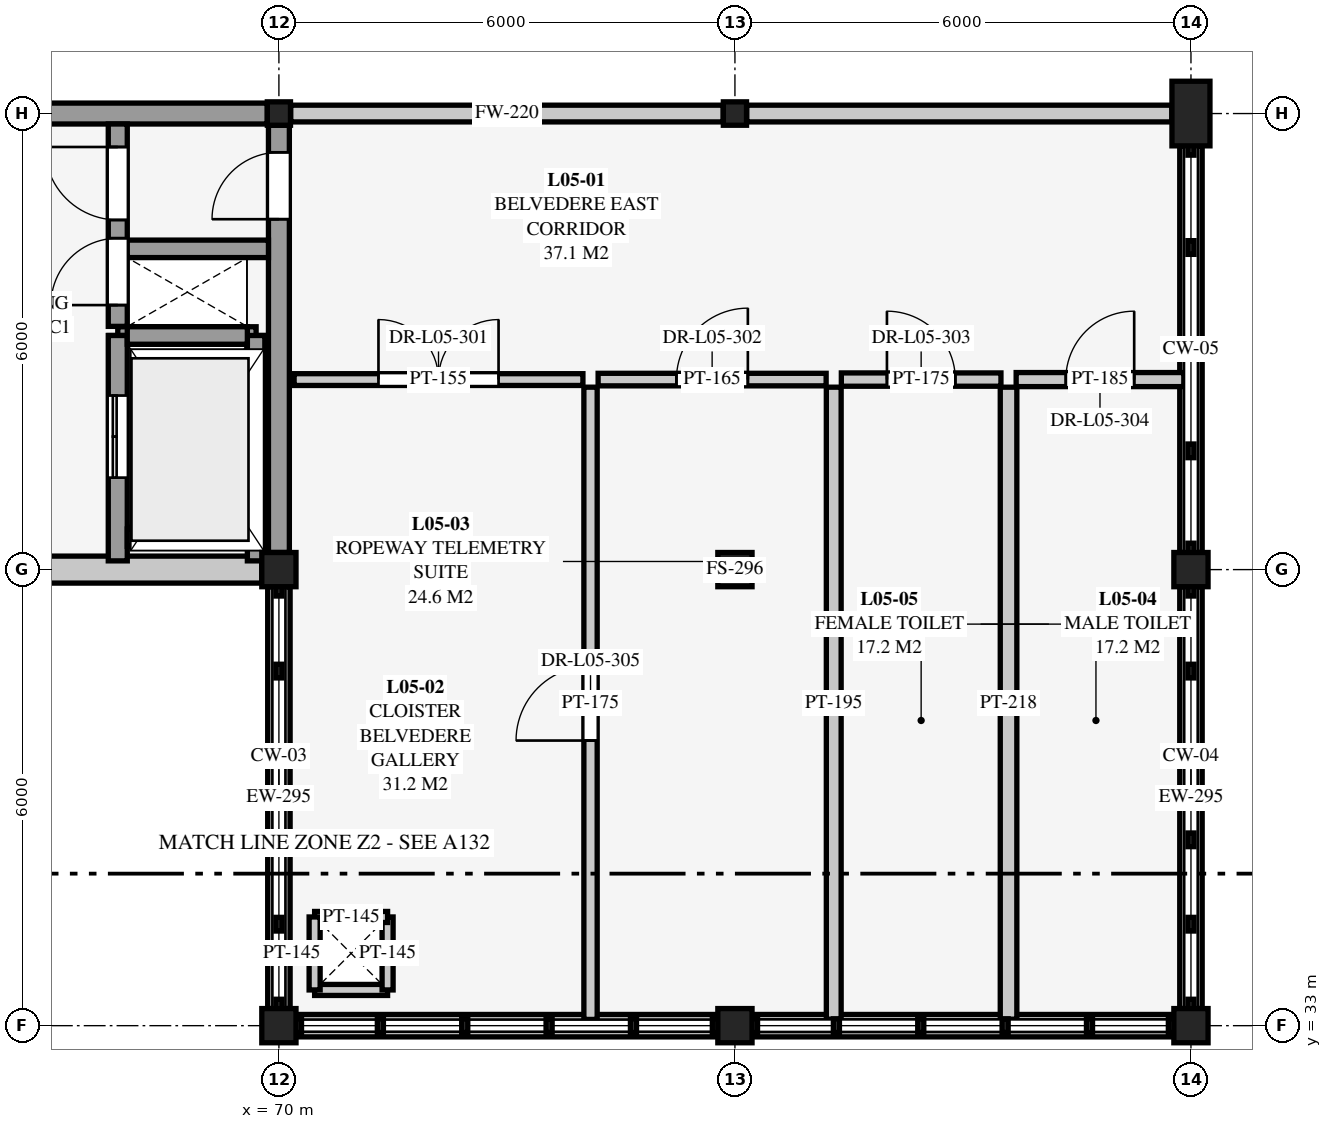
"""IFC4 building model, lengths in metres.
Left out: names, types, materials, properties, quantities, classifications, styles, units other than length and angle.
Written with IfcOpenShell. Run it as: python <this file> out.ifc"""

import sys

from ifc_helpers import new_model, si_unit, direction, frame, frame_2d, origin, origin_2d, place, context, subcontext, project, spatial, rectangle, i_section, extrude, element, fill, save


model = new_model("IFC4")
c1 = context("Model", 3, precision=1e-05, world=origin(), true_north=direction((0.0, 1.0)))
c2 = subcontext(c1, "Body", "Model", "MODEL_VIEW")
j1 = project(units=[si_unit("LENGTHUNIT", "METRE"), si_unit("PLANEANGLEUNIT", "RADIAN")], contexts=[c1])
p1 = place(None, origin())
s1 = spatial("IfcSite", under=j1, at=p1, CompositionType="ELEMENT")
p2 = place(p1, origin())
s2 = spatial("IfcBuilding", under=s1, at=p2, CompositionType="ELEMENT")
p3 = place(p2, frame((0.0, 0.0, 18.0)))
s3 = spatial("IfcBuildingStorey", under=s2, at=p3, CompositionType="ELEMENT", Elevation=18.0)
for number, where, z_axis, x_axis in (
    (1, (70.0, 33.0, 0.0), (0.0, 0.0, 1.0), (1.0, 0.0, 0.0)),
    (2, (70.0, 39.0, 0.0), (0.0, 0.0, 1.0), (1.0, 0.0, 0.0)),
):
    element("IfcColumn", number, at=place(p3, frame(where, z_axis=z_axis, x_axis=x_axis)), inside=s3, PredefinedType="COLUMN", context=c2, shape_type="SweptSolid", body=[
        extrude(rectangle(XDim=0.45, YDim=0.45, at=origin_2d()), origin(), (0.0, 0.0, 1.0), 4.5),
    ])
p4 = place(p3, frame((70.0, 45.0, 0.0), z_axis=(0.0, 0.0, 1.0), x_axis=(1.0, 0.0, 0.0)))
e3 = element("IfcColumn", 3, at=p4, inside=s3, PredefinedType="COLUMN", context=c2, shape_type="SweptSolid", body=[
    extrude(i_section(OverallWidth=0.305, OverallDepth=0.308, WebThickness=0.01, FlangeThickness=0.015, at=origin_2d()), origin(), (0.0, 0.0, 1.0), 4.5),
])
for number, where, z_axis, x_axis in (
    (4, (76.0, 33.0, 0.0), (0.0, 0.0, 1.0), (1.0, 0.0, 0.0)),
    (5, (76.0, 39.0, 0.0), (0.0, 0.0, 1.0), (1.0, 0.0, 0.0)),
):
    element("IfcColumn", number, at=place(p3, frame(where, z_axis=z_axis, x_axis=x_axis)), inside=s3, PredefinedType="COLUMN", context=c2, shape_type="SweptSolid", body=[
        extrude(rectangle(XDim=0.45, YDim=0.45, at=origin_2d()), origin(), (0.0, 0.0, 1.0), 4.5),
    ])
p5 = place(p3, frame((76.0, 45.0, 0.0), z_axis=(0.0, 0.0, 1.0), x_axis=(1.0, 0.0, 0.0)))
e6 = element("IfcColumn", 6, at=p5, inside=s3, PredefinedType="COLUMN", context=c2, shape_type="SweptSolid", body=[
    extrude(i_section(OverallWidth=0.305, OverallDepth=0.308, WebThickness=0.01, FlangeThickness=0.015, at=origin_2d()), origin(), (0.0, 0.0, 1.0), 4.5),
])
for number, where, z_axis, x_axis in (
    (7, (82.0, 33.0, 0.0), (0.0, 0.0, 1.0), (1.0, 0.0, 0.0)),
    (8, (82.0, 39.0, 0.0), (0.0, 0.0, 1.0), (1.0, 0.0, 0.0)),
):
    element("IfcColumn", number, at=place(p3, frame(where, z_axis=z_axis, x_axis=x_axis)), inside=s3, PredefinedType="COLUMN", context=c2, shape_type="SweptSolid", body=[
        extrude(rectangle(XDim=0.45, YDim=0.45, at=origin_2d()), origin(), (0.0, 0.0, 1.0), 4.5),
    ])
p6 = place(p3, frame((82.0, 45.0, 0.0), z_axis=(0.0, 0.0, 1.0), x_axis=(1.0, 0.0, 0.0)))
e9 = element("IfcColumn", 9, at=p6, inside=s3, PredefinedType="PILASTER", context=c2, shape_type="SweptSolid", body=[
    extrude(rectangle(XDim=0.5, YDim=0.85, at=origin_2d()), origin(), (0.0, 0.0, 1.0), 4.5),
])
p7 = place(p2, frame((0.0, 0.0, 13.5)))
s4 = spatial("IfcBuildingStorey", under=s2, at=p7, CompositionType="ELEMENT", Elevation=13.5)
p8 = place(p7, frame((87.75, 45.0, 0.0), z_axis=(0.0, 0.0, 1.0), x_axis=(-1.0, 0.0, 0.0)))
e10 = element("IfcWall", 10, at=p8, inside=s4, PredefinedType="SOLIDWALL", context=c2, shape_type="SweptSolid", body=[
    extrude(rectangle(XDim=5.5, YDim=0.4, at=frame_2d((2.75, 0.0))), origin(), (0.0, 0.0, 1.0), 8.593),
])
p9 = place(p8, frame((2.1, 0.0, 1.3)))
e11 = element("IfcOpeningElement", 11, at=p9, cuts=e10, PredefinedType="OPENING", context=c2, shape_type="SweptSolid", body=[
    extrude(rectangle(XDim=1.3, YDim=1.45, at=frame_2d((0.65, 0.725))), frame((0.0, 0.21, 0.0), z_axis=(0.0, -1.0, 0.0), x_axis=(1.0, 0.0, 0.0)), (0.0, 0.0, 1.0), 0.42),
])
p10 = place(p3, frame((69.775, 39.0, 0.0), z_axis=(0.0, 0.0, 1.0), x_axis=(-1.0, 0.0, 0.0)))
e12 = element("IfcWall", 12, at=p10, inside=s3, PredefinedType="SOLIDWALL", context=c2, shape_type="SweptSolid", body=[
    extrude(rectangle(XDim=5.55, YDim=0.355, at=frame_2d((2.775, 0.0))), origin(), (0.0, 0.0, 1.0), 4.234),
])
p11 = place(p3, frame((75.775, 33.0, 0.0), z_axis=(0.0, 0.0, 1.0), x_axis=(-1.0, 0.0, 0.0)))
e13 = element("IfcWall", 13, at=p11, inside=s3, PredefinedType="SOLIDWALL", context=c2, shape_type="SweptSolid", body=[
    extrude(rectangle(XDim=5.55, YDim=0.295, at=frame_2d((2.775, 0.0))), origin(), (0.0, 0.0, 1.0), 0.16),
])
p12 = place(p3, frame((81.775, 33.0, 0.0), z_axis=(0.0, 0.0, 1.0), x_axis=(-1.0, 0.0, 0.0)))
e14 = element("IfcWall", 14, at=p12, inside=s3, PredefinedType="SOLIDWALL", context=c2, shape_type="SweptSolid", body=[
    extrude(rectangle(XDim=5.55, YDim=0.295, at=frame_2d((2.775, 0.0))), origin(), (0.0, 0.0, 1.0), 0.21),
])
p13 = place(p3, frame((70.0, 33.225, 0.0), z_axis=(0.0, 0.0, 1.0), x_axis=(0.0, 1.0, 0.0)))
e15 = element("IfcWall", 15, at=p13, inside=s3, PredefinedType="SOLIDWALL", context=c2, shape_type="SweptSolid", body=[
    extrude(rectangle(XDim=5.55, YDim=0.295, at=frame_2d((2.775, 0.0))), origin(), (0.0, 0.0, 1.0), 0.26),
])
p14 = place(p3, frame((82.0, 38.775, 0.0), z_axis=(0.0, 0.0, 1.0), x_axis=(0.0, -1.0, 0.0)))
e16 = element("IfcWall", 16, at=p14, inside=s3, PredefinedType="SOLIDWALL", context=c2, shape_type="SweptSolid", body=[
    extrude(rectangle(XDim=5.55, YDim=0.295, at=frame_2d((2.775, 0.0))), origin(), (0.0, 0.0, 1.0), 0.31),
])
p15 = place(p3, frame((82.0, 44.575, 0.0), z_axis=(0.0, 0.0, 1.0), x_axis=(0.0, -1.0, 0.0)))
e17 = element("IfcWall", 17, at=p15, inside=s3, PredefinedType="SOLIDWALL", context=c2, shape_type="SweptSolid", body=[
    extrude(rectangle(XDim=5.35, YDim=0.295, at=frame_2d((2.675, 0.0))), origin(), (0.0, 0.0, 1.0), 0.36),
])
for number, where, z_axis, x_axis in (
    (18, (70.47, 33.47, 0.0), (0.0, 0.0, 1.0), (1.0, 0.0, 0.0)),
    (19, (71.43, 33.47, 0.0), (0.0, 0.0, 1.0), (0.0, 1.0, 0.0)),
    (20, (71.43, 34.43, 0.0), (0.0, 0.0, 1.0), (-1.0, 0.0, 0.0)),
    (21, (70.47, 34.43, 0.0), (0.0, 0.0, 1.0), (0.0, -1.0, 0.0)),
):
    element("IfcWall", number, at=place(p3, frame(where, z_axis=z_axis, x_axis=x_axis)), inside=s3, PredefinedType="PARTITIONING", context=c2, shape_type="SweptSolid", body=[
        extrude(rectangle(XDim=0.96, YDim=0.145, at=frame_2d((0.48, 0.0))), origin(), (0.0, 0.0, 1.0), 4.24),
    ])
p16 = place(p3, frame((67.88, 39.42, 4.5), z_axis=(0.0, 0.0, 1.0), x_axis=(1.0, 0.0, 0.0)))
e22 = element("IfcWall", 22, at=p16, inside=s3, PredefinedType="SHEAR", context=c2, shape_type="SweptSolid", body=[
    extrude(rectangle(XDim=1.82, YDim=0.23, at=frame_2d((0.91, 0.0))), origin(), (0.0, 0.0, 1.0), 1.25),
])
p17 = place(p3, frame((69.7, 39.42, 4.5), z_axis=(0.0, 0.0, 1.0), x_axis=(0.0, 1.0, 0.0)))
e23 = element("IfcWall", 23, at=p17, inside=s3, PredefinedType="SHEAR", context=c2, shape_type="SweptSolid", body=[
    extrude(rectangle(XDim=2.66, YDim=0.23, at=frame_2d((1.33, 0.0))), origin(), (0.0, 0.0, 1.0), 1.25),
])
p18 = place(p3, frame((69.7, 42.08, 4.5), z_axis=(0.0, 0.0, 1.0), x_axis=(-1.0, 0.0, 0.0)))
e24 = element("IfcWall", 24, at=p18, inside=s3, PredefinedType="SHEAR", context=c2, shape_type="SweptSolid", body=[
    extrude(rectangle(XDim=1.82, YDim=0.23, at=frame_2d((0.91, 0.0))), origin(), (0.0, 0.0, 1.0), 1.25),
])
p19 = place(p3, frame((67.88, 42.08, 4.5), z_axis=(0.0, 0.0, 1.0), x_axis=(0.0, -1.0, 0.0)))
e25 = element("IfcWall", 25, at=p19, inside=s3, PredefinedType="SHEAR", context=c2, shape_type="SweptSolid", body=[
    extrude(rectangle(XDim=2.66, YDim=0.23, at=frame_2d((1.33, 0.0))), origin(), (0.0, 0.0, 1.0), 1.25),
])
p20 = place(p3, frame((64.153, 45.0, 0.0), z_axis=(0.0, 0.0, 1.0), x_axis=(1.0, 0.0, 0.0)))
e26 = element("IfcWall", 26, at=p20, inside=s3, PredefinedType="SHEAR", context=c2, shape_type="SweptSolid", body=[
    extrude(rectangle(XDim=5.695, YDim=0.275, at=frame_2d((2.847, 0.0))), origin(), (0.0, 0.0, 1.0), 4.24),
])
p21 = place(p3, frame((70.0, 39.225, 0.0), z_axis=(0.0, 0.0, 1.0), x_axis=(0.0, 1.0, 0.0)))
e27 = element("IfcWall", 27, at=p21, inside=s3, PredefinedType="SHEAR", context=c2, shape_type="SweptSolid", body=[
    extrude(rectangle(XDim=5.621, YDim=0.275, at=frame_2d((2.811, 0.0))), origin(), (0.0, 0.0, 1.0), 4.24),
])
p22 = place(p21, frame((4.385, 0.0, 0.0)))
e28 = element("IfcOpeningElement", 28, at=p22, cuts=e27, PredefinedType="OPENING", context=c2, shape_type="SweptSolid", body=[
    extrude(rectangle(XDim=0.88, YDim=2.08, at=frame_2d((0.44, 1.04))), frame((0.0, 0.147, 0.0), z_axis=(0.0, -1.0, 0.0), x_axis=(1.0, 0.0, 0.0)), (0.0, 0.0, 1.0), 0.295),
])
p23 = place(p3, frame((67.88, 39.115, 0.0), z_axis=(0.0, 0.0, 1.0), x_axis=(0.0, 1.0, 0.0)))
e29 = element("IfcWall", 29, at=p23, inside=s3, PredefinedType="SHEAR", context=c2, shape_type="SweptSolid", body=[
    extrude(rectangle(XDim=2.965, YDim=0.25, at=frame_2d((1.482, 0.0))), origin(), (0.0, 0.0, 1.0), 4.5),
])
p24 = place(p23, frame((1.095, 0.0, 0.0)))
e30 = element("IfcOpeningElement", 30, at=p24, cuts=e29, PredefinedType="OPENING", context=c2, shape_type="SweptSolid", body=[
    extrude(rectangle(XDim=1.08, YDim=2.15, at=frame_2d((0.54, 1.075))), frame((0.0, 0.135, 0.0), z_axis=(0.0, -1.0, 0.0), x_axis=(1.0, 0.0, 0.0)), (0.0, 0.0, 1.0), 0.27),
])
p25 = place(p3, frame((68.005, 39.42, 0.0), z_axis=(0.0, 0.0, 1.0), x_axis=(1.0, 0.0, 0.0)))
e31 = element("IfcWall", 31, at=p25, inside=s3, PredefinedType="SHEAR", context=c2, shape_type="SweptSolid", body=[
    extrude(rectangle(XDim=1.58, YDim=0.23, at=frame_2d((0.79, 0.0))), origin(), (0.0, 0.0, 1.0), 4.5),
])
p26 = place(p3, frame((69.7, 39.115, 0.0), z_axis=(0.0, 0.0, 1.0), x_axis=(0.0, 1.0, 0.0)))
e32 = element("IfcWall", 32, at=p26, inside=s3, PredefinedType="SHEAR", context=c2, shape_type="SweptSolid", body=[
    extrude(rectangle(XDim=2.965, YDim=0.23, at=frame_2d((1.482, 0.0))), origin(), (0.0, 0.0, 1.0), 4.5),
])
p27 = place(p3, frame((68.005, 42.08, 0.0), z_axis=(0.0, 0.0, 1.0), x_axis=(1.0, 0.0, 0.0)))
e33 = element("IfcWall", 33, at=p27, inside=s3, PredefinedType="SHEAR", context=c2, shape_type="SweptSolid", body=[
    extrude(rectangle(XDim=1.58, YDim=0.23, at=frame_2d((0.79, 0.0))), origin(), (0.0, 0.0, 1.0), 4.5),
])
p28 = place(p3, frame((67.88, 42.2, 0.0), z_axis=(0.0, 0.0, 1.0), x_axis=(0.0, 1.0, 0.0)))
e34 = element("IfcWall", 34, at=p28, inside=s3, PredefinedType="SHEAR", context=c2, shape_type="SweptSolid", body=[
    extrude(rectangle(XDim=2.663, YDim=0.25, at=frame_2d((1.331, 0.0))), origin(), (0.0, 0.0, 1.0), 4.24),
])
p29 = place(p28, frame((0.28, 0.0, 0.0)))
e35 = element("IfcOpeningElement", 35, at=p29, cuts=e34, PredefinedType="OPENING", context=c2, shape_type="SweptSolid", body=[
    extrude(rectangle(XDim=0.88, YDim=2.08, at=frame_2d((0.44, 1.04))), frame((0.0, 0.135, 0.0), z_axis=(0.0, -1.0, 0.0), x_axis=(1.0, 0.0, 0.0)), (0.0, 0.0, 1.0), 0.27),
])
p30 = place(p28, frame((1.4, 0.0, 0.0)))
e36 = element("IfcOpeningElement", 36, at=p30, cuts=e34, PredefinedType="OPENING", context=c2, shape_type="SweptSolid", body=[
    extrude(rectangle(XDim=0.96, YDim=2.12, at=frame_2d((0.48, 1.06))), frame((0.0, 0.135, 0.0), z_axis=(0.0, -1.0, 0.0), x_axis=(1.0, 0.0, 0.0)), (0.0, 0.0, 1.0), 0.27),
])
p31 = place(p3, frame((68.005, 43.22, 0.0), z_axis=(0.0, 0.0, 1.0), x_axis=(1.0, 0.0, 0.0)))
e37 = element("IfcWall", 37, at=p31, inside=s3, PredefinedType="SHEAR", context=c2, shape_type="SweptSolid", body=[
    extrude(rectangle(XDim=1.858, YDim=0.23, at=frame_2d((0.929, 0.0))), origin(), (0.0, 0.0, 1.0), 4.24),
])
p32 = place(p3, frame((70.155, 45.0, 0.0), z_axis=(0.0, 0.0, 1.0), x_axis=(1.0, 0.0, 0.0)))
e38 = element("IfcWall", 38, at=p32, inside=s3, PredefinedType="SOLIDWALL", context=c2, shape_type="SweptSolid", body=[
    extrude(rectangle(XDim=5.691, YDim=0.22, at=frame_2d((2.845, 0.0))), origin(), (0.0, 0.0, 1.0), 4.087),
])
p33 = place(p3, frame((76.155, 45.0, 0.0), z_axis=(0.0, 0.0, 1.0), x_axis=(1.0, 0.0, 0.0)))
e39 = element("IfcWall", 39, at=p33, inside=s3, PredefinedType="SOLIDWALL", context=c2, shape_type="SweptSolid", body=[
    extrude(rectangle(XDim=5.594, YDim=0.22, at=frame_2d((2.797, 0.0))), origin(), (0.0, 0.0, 1.0), 4.037),
])
p34 = place(p3, frame((70.2, 41.5, 0.0), z_axis=(0.0, 0.0, 1.0), x_axis=(1.0, 0.0, 0.0)))
e40 = element("IfcWall", 40, at=p34, inside=s3, PredefinedType="PARTITIONING", context=c2, shape_type="SweptSolid", body=[
    extrude(rectangle(XDim=3.8, YDim=0.155, at=frame_2d((1.9, 0.0))), origin(), (0.0, 0.0, 1.0), 4.24),
])
p35 = place(p34, frame((1.11, 0.0, 0.0)))
e41 = element("IfcOpeningElement", 41, at=p35, cuts=e40, PredefinedType="OPENING", context=c2, shape_type="SweptSolid", body=[
    extrude(rectangle(XDim=1.58, YDim=2.2, at=frame_2d((0.79, 1.1))), frame((0.0, 0.088, 0.0), z_axis=(0.0, -1.0, 0.0), x_axis=(1.0, 0.0, 0.0)), (0.0, 0.0, 1.0), 0.175),
])
p36 = place(p3, frame((74.2, 41.5, 0.0), z_axis=(0.0, 0.0, 1.0), x_axis=(1.0, 0.0, 0.0)))
e42 = element("IfcWall", 42, at=p36, inside=s3, PredefinedType="PARTITIONING", context=c2, shape_type="SweptSolid", body=[
    extrude(rectangle(XDim=3.0, YDim=0.165, at=frame_2d((1.5, 0.0))), origin(), (0.0, 0.0, 1.0), 4.24),
])
p37 = place(p36, frame((1.03, 0.0, 0.0)))
e43 = element("IfcOpeningElement", 43, at=p37, cuts=e42, PredefinedType="OPENING", context=c2, shape_type="SweptSolid", body=[
    extrude(rectangle(XDim=0.94, YDim=2.1, at=frame_2d((0.47, 1.05))), frame((0.0, 0.093, 0.0), z_axis=(0.0, -1.0, 0.0), x_axis=(1.0, 0.0, 0.0)), (0.0, 0.0, 1.0), 0.185),
])
p38 = place(p3, frame((77.4, 41.5, 0.0), z_axis=(0.0, 0.0, 1.0), x_axis=(1.0, 0.0, 0.0)))
e44 = element("IfcWall", 44, at=p38, inside=s3, PredefinedType="PARTITIONING", context=c2, shape_type="SweptSolid", body=[
    extrude(rectangle(XDim=2.1, YDim=0.175, at=frame_2d((1.05, 0.0))), origin(), (0.0, 0.0, 1.0), 4.24),
])
p39 = place(p38, frame((0.6, 0.0, 0.0)))
e45 = element("IfcOpeningElement", 45, at=p39, cuts=e44, PredefinedType="OPENING", context=c2, shape_type="SweptSolid", body=[
    extrude(rectangle(XDim=0.9, YDim=2.1, at=frame_2d((0.45, 1.05))), frame((0.0, 0.097, 0.0), z_axis=(0.0, -1.0, 0.0), x_axis=(1.0, 0.0, 0.0)), (0.0, 0.0, 1.0), 0.195),
])
p40 = place(p3, frame((79.7, 41.5, 0.0), z_axis=(0.0, 0.0, 1.0), x_axis=(1.0, 0.0, 0.0)))
e46 = element("IfcWall", 46, at=p40, inside=s3, PredefinedType="PARTITIONING", context=c2, shape_type="SweptSolid", body=[
    extrude(rectangle(XDim=2.206, YDim=0.185, at=frame_2d((1.103, 0.0))), origin(), (0.0, 0.0, 1.0), 4.24),
])
p41 = place(p40, frame((0.653, 0.0, 0.0)))
e47 = element("IfcOpeningElement", 47, at=p41, cuts=e46, PredefinedType="OPENING", context=c2, shape_type="SweptSolid", body=[
    extrude(rectangle(XDim=0.9, YDim=2.1, at=frame_2d((0.45, 1.05))), frame((0.0, 0.103, 0.0), z_axis=(0.0, -1.0, 0.0), x_axis=(1.0, 0.0, 0.0)), (0.0, 0.0, 1.0), 0.205),
])
p42 = place(p3, frame((74.1, 33.082, 0.0), z_axis=(0.0, 0.0, 1.0), x_axis=(0.0, 1.0, 0.0)))
e48 = element("IfcWall", 48, at=p42, inside=s3, PredefinedType="PARTITIONING", context=c2, shape_type="SweptSolid", body=[
    extrude(rectangle(XDim=8.318, YDim=0.175, at=frame_2d((4.159, 0.0))), origin(), (0.0, 0.0, 1.0), 4.24),
])
p43 = place(p42, frame((3.669, 0.0, 0.0)))
e49 = element("IfcOpeningElement", 49, at=p43, cuts=e48, PredefinedType="OPENING", context=c2, shape_type="SweptSolid", body=[
    extrude(rectangle(XDim=0.98, YDim=2.14, at=frame_2d((0.49, 1.07))), frame((0.0, 0.097, 0.0), z_axis=(0.0, -1.0, 0.0), x_axis=(1.0, 0.0, 0.0)), (0.0, 0.0, 1.0), 0.195),
])
p44 = place(p3, frame((77.3, 33.085, 0.0), z_axis=(0.0, 0.0, 1.0), x_axis=(0.0, 1.0, 0.0)))
e50 = element("IfcWall", 50, at=p44, inside=s3, PredefinedType="PARTITIONING", context=c2, shape_type="SweptSolid", body=[
    extrude(rectangle(XDim=8.315, YDim=0.195, at=frame_2d((4.157, 0.0))), origin(), (0.0, 0.0, 1.0), 4.24),
])
p45 = place(p3, frame((79.6, 33.085, 0.0), z_axis=(0.0, 0.0, 1.0), x_axis=(0.0, 1.0, 0.0)))
e51 = element("IfcWall", 51, at=p45, inside=s3, PredefinedType="PARTITIONING", context=c2, shape_type="SweptSolid", body=[
    extrude(rectangle(XDim=8.315, YDim=0.218, at=frame_2d((4.157, 0.0))), origin(), (0.0, 0.0, 1.0), 4.24),
])
p46 = place(p22, origin())
e52 = element("IfcDoor", 52, at=p46, inside=s3, OperationType="SINGLE_SWING_LEFT", PredefinedType="DOOR", context=c2, shape_type="SweptSolid", body=[
    extrude(rectangle(XDim=0.88, YDim=2.08, at=frame_2d((0.44, 1.04))), frame((0.0, 0.025, 0.0), z_axis=(0.0, -1.0, 0.0), x_axis=(1.0, 0.0, 0.0)), (0.0, 0.0, 1.0), 0.05),
])
fill(e28, e52)
p47 = place(p24, origin())
e53 = element("IfcDoor", 53, at=p47, inside=s3, OperationType="DOUBLE_DOOR_SLIDING", PredefinedType="DOOR", context=c2, shape_type="SweptSolid", body=[
    extrude(rectangle(XDim=1.08, YDim=2.15, at=frame_2d((0.54, 1.075))), frame((0.0, 0.025, 0.0), z_axis=(0.0, -1.0, 0.0), x_axis=(1.0, 0.0, 0.0)), (0.0, 0.0, 1.0), 0.05),
])
fill(e30, e53)
p48 = place(p29, origin())
e54 = element("IfcDoor", 54, at=p48, inside=s3, OperationType="SINGLE_SWING_LEFT", PredefinedType="DOOR", context=c2, shape_type="SweptSolid", body=[
    extrude(rectangle(XDim=0.88, YDim=2.08, at=frame_2d((0.44, 1.04))), frame((0.0, 0.025, 0.0), z_axis=(0.0, -1.0, 0.0), x_axis=(1.0, 0.0, 0.0)), (0.0, 0.0, 1.0), 0.05),
])
fill(e35, e54)
p49 = place(p30, origin())
e55 = element("IfcDoor", 55, at=p49, inside=s3, OperationType="SINGLE_SWING_RIGHT", PredefinedType="DOOR", context=c2, shape_type="SweptSolid", body=[
    extrude(rectangle(XDim=0.96, YDim=2.12, at=frame_2d((0.48, 1.06))), frame((0.0, 0.025, 0.0), z_axis=(0.0, -1.0, 0.0), x_axis=(1.0, 0.0, 0.0)), (0.0, 0.0, 1.0), 0.05),
])
fill(e36, e55)
p50 = place(p35, origin())
e56 = element("IfcDoor", 56, at=p50, inside=s3, OperationType="DOUBLE_DOOR_SINGLE_SWING", PredefinedType="DOOR", context=c2, shape_type="SweptSolid", body=[
    extrude(rectangle(XDim=1.58, YDim=2.2, at=frame_2d((0.79, 1.1))), frame((0.0, 0.025, 0.0), z_axis=(0.0, -1.0, 0.0), x_axis=(1.0, 0.0, 0.0)), (0.0, 0.0, 1.0), 0.05),
])
fill(e41, e56)
p51 = place(p37, origin())
e57 = element("IfcDoor", 57, at=p51, inside=s3, OperationType="SINGLE_SWING_RIGHT", PredefinedType="DOOR", context=c2, shape_type="SweptSolid", body=[
    extrude(rectangle(XDim=0.94, YDim=2.1, at=frame_2d((0.47, 1.05))), frame((0.0, 0.025, 0.0), z_axis=(0.0, -1.0, 0.0), x_axis=(1.0, 0.0, 0.0)), (0.0, 0.0, 1.0), 0.05),
])
fill(e43, e57)
p52 = place(p39, origin())
e58 = element("IfcDoor", 58, at=p52, inside=s3, OperationType="SINGLE_SWING_LEFT", PredefinedType="DOOR", context=c2, shape_type="SweptSolid", body=[
    extrude(rectangle(XDim=0.9, YDim=2.1, at=frame_2d((0.45, 1.05))), frame((0.0, 0.025, 0.0), z_axis=(0.0, -1.0, 0.0), x_axis=(1.0, 0.0, 0.0)), (0.0, 0.0, 1.0), 0.05),
])
fill(e45, e58)
p53 = place(p41, origin())
e59 = element("IfcDoor", 59, at=p53, inside=s3, OperationType="SINGLE_SWING_RIGHT", PredefinedType="DOOR", context=c2, shape_type="SweptSolid", body=[
    extrude(rectangle(XDim=0.9, YDim=2.1, at=frame_2d((0.45, 1.05))), frame((0.0, 0.025, 0.0), z_axis=(0.0, -1.0, 0.0), x_axis=(1.0, 0.0, 0.0)), (0.0, 0.0, 1.0), 0.05),
])
fill(e47, e59)
p54 = place(p43, origin())
e60 = element("IfcDoor", 60, at=p54, inside=s3, OperationType="SINGLE_SWING_LEFT", PredefinedType="DOOR", context=c2, shape_type="SweptSolid", body=[
    extrude(rectangle(XDim=0.98, YDim=2.14, at=frame_2d((0.49, 1.07))), frame((0.0, 0.025, 0.0), z_axis=(0.0, -1.0, 0.0), x_axis=(1.0, 0.0, 0.0)), (0.0, 0.0, 1.0), 0.05),
])
fill(e49, e60)
save(model, sys.argv[1])
